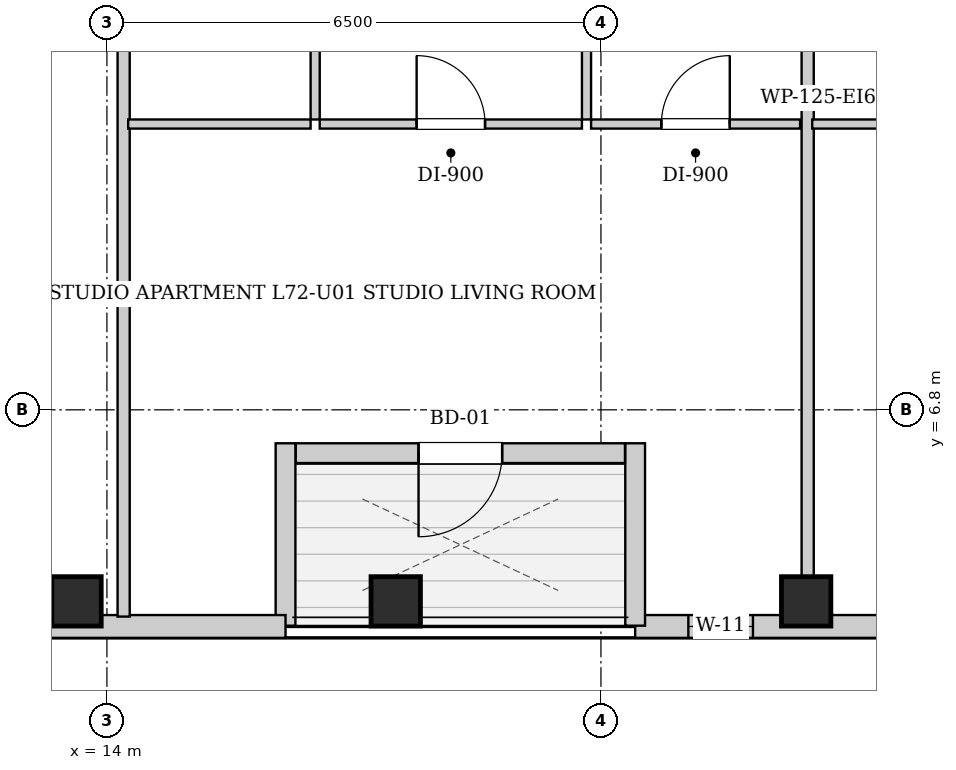
"""IFC4 building model, lengths in metres.
Left out: names, types, materials, properties, quantities, classifications, styles, units other than length and angle.
Written with IfcOpenShell. Run it as: python <this file> out.ifc"""

import sys

from ifc_helpers import new_model, si_unit, direction, frame, frame_2d, origin, origin_2d, place, context, subcontext, project, spatial, rectangle, extrude, element, fill, save


model = new_model("IFC4")
c1 = context("Model", 3, precision=1e-05, world=origin(), true_north=direction((0.0, 1.0)))
c2 = subcontext(c1, "Body", "Model", "MODEL_VIEW")
j1 = project(units=[si_unit("LENGTHUNIT", "METRE"), si_unit("PLANEANGLEUNIT", "RADIAN")], contexts=[c1])
p1 = place(None, origin())
s1 = spatial("IfcSite", under=j1, at=p1, CompositionType="ELEMENT")
p2 = place(p1, origin())
s2 = spatial("IfcBuilding", under=s1, at=p2, CompositionType="ELEMENT")
p3 = place(p2, frame((0.0, 0.0, 247.9)))
s3 = spatial("IfcBuildingStorey", under=s2, at=p3, CompositionType="ELEMENT", Elevation=247.9)
for number, where, z_axis, x_axis in (
    (1, (13.6, 4.28, 0.0), (0.0, 0.0, 1.0), (1.0, 0.0, 0.0)),
    (2, (17.8, 4.28, 0.0), (0.0, 0.0, 1.0), (1.0, 0.0, 0.0)),
    (3, (23.2, 4.28, 0.0), (0.0, 0.0, 1.0), (1.0, 0.0, 0.0)),
):
    element("IfcColumn", number, at=place(p3, frame(where, z_axis=z_axis, x_axis=x_axis)), inside=s3, PredefinedType="COLUMN", context=c2, shape_type="SweptSolid", body=[
        extrude(rectangle(XDim=0.65, YDim=0.65, at=origin_2d()), origin(), (0.0, 0.0, 1.0), 3.4),
    ])
p4 = place(p3, frame((37.8, 3.95, 0.0), z_axis=(0.0, 0.0, 1.0), x_axis=(-1.0, 0.0, 0.0)))
e4 = element("IfcWall", 4, at=p4, inside=s3, PredefinedType="SOLIDWALL", context=c2, shape_type="SweptSolid", body=[
    extrude(rectangle(XDim=16.85, YDim=0.3, at=frame_2d((8.425, 0.0))), origin(), (0.0, 0.0, 1.0), 3.14),
])
p5 = place(p4, frame((15.3, 0.0, 0.55)))
e5 = element("IfcOpeningElement", 5, at=p5, cuts=e4, PredefinedType="OPENING", context=c2, shape_type="SweptSolid", body=[
    extrude(rectangle(XDim=0.85, YDim=1.2, at=frame_2d((0.425, 0.6))), frame((0.0, 0.16, 0.0), z_axis=(0.0, -1.0, 0.0), x_axis=(1.0, 0.0, 0.0)), (0.0, 0.0, 1.0), 0.32),
])
p6 = place(p4, frame((8.95, 0.0, 0.55)))
e6 = element("IfcOpeningElement", 6, at=p6, cuts=e4, PredefinedType="OPENING", context=c2, shape_type="SweptSolid", body=[
    extrude(rectangle(XDim=1.35, YDim=1.2, at=frame_2d((0.675, 0.6))), frame((0.0, 0.16, 0.0), z_axis=(0.0, -1.0, 0.0), x_axis=(1.0, 0.0, 0.0)), (0.0, 0.0, 1.0), 0.32),
])
p7 = place(p4, frame((5.085, 0.0, 0.55)))
e7 = element("IfcOpeningElement", 7, at=p7, cuts=e4, PredefinedType="OPENING", context=c2, shape_type="SweptSolid", body=[
    extrude(rectangle(XDim=1.35, YDim=1.2, at=frame_2d((0.675, 0.6))), frame((0.0, 0.16, 0.0), z_axis=(0.0, -1.0, 0.0), x_axis=(1.0, 0.0, 0.0)), (0.0, 0.0, 1.0), 0.32),
])
p8 = place(p4, frame((2.757, 0.0, 0.55)))
e8 = element("IfcOpeningElement", 8, at=p8, cuts=e4, PredefinedType="OPENING", context=c2, shape_type="SweptSolid", body=[
    extrude(rectangle(XDim=1.35, YDim=1.2, at=frame_2d((0.675, 0.6))), frame((0.0, 0.16, 0.0), z_axis=(0.0, -1.0, 0.0), x_axis=(1.0, 0.0, 0.0)), (0.0, 0.0, 1.0), 0.32),
])
p9 = place(p3, frame((20.95, 3.96, 0.0), z_axis=(0.0, 0.0, 1.0), x_axis=(0.0, 1.0, 0.0)))
e9 = element("IfcWall", 9, at=p9, inside=s3, PredefinedType="SOLIDWALL", context=c2, shape_type="SweptSolid", body=[
    extrude(rectangle(XDim=2.4, YDim=0.26, at=frame_2d((1.2, 0.0))), origin(), (0.0, 0.0, 1.0), 3.14),
])
p10 = place(p3, frame((20.816, 6.23, 0.0), z_axis=(0.0, 0.0, 1.0), x_axis=(-1.0, 0.0, 0.0)))
e10 = element("IfcWall", 10, at=p10, inside=s3, PredefinedType="SOLIDWALL", context=c2, shape_type="SweptSolid", body=[
    extrude(rectangle(XDim=4.332, YDim=0.26, at=frame_2d((2.166, 0.0))), origin(), (0.0, 0.0, 1.0), 3.14),
])
p11 = place(p10, frame((1.616, 0.0, 0.0)))
e11 = element("IfcOpeningElement", 11, at=p11, cuts=e10, PredefinedType="OPENING", context=c2, shape_type="SweptSolid", body=[
    extrude(rectangle(XDim=1.1, YDim=2.0, at=frame_2d((0.55, 1.0))), frame((0.0, 0.14, 0.0), z_axis=(0.0, -1.0, 0.0), x_axis=(1.0, 0.0, 0.0)), (0.0, 0.0, 1.0), 0.28),
])
p12 = place(p3, frame((16.35, 6.36, 0.0), z_axis=(0.0, 0.0, 1.0), x_axis=(0.0, -1.0, 0.0)))
e12 = element("IfcWall", 12, at=p12, inside=s3, PredefinedType="SOLIDWALL", context=c2, shape_type="SweptSolid", body=[
    extrude(rectangle(XDim=2.4, YDim=0.26, at=frame_2d((1.2, 0.0))), origin(), (0.0, 0.0, 1.0), 3.14),
])
p13 = place(p3, frame((16.35, 3.95, 0.0), z_axis=(0.0, 0.0, 1.0), x_axis=(-1.0, 0.0, 0.0)))
e13 = element("IfcWall", 13, at=p13, inside=s3, PredefinedType="SOLIDWALL", context=c2, shape_type="SweptSolid", body=[
    extrude(rectangle(XDim=3.25, YDim=0.3, at=frame_2d((1.625, 0.0))), origin(), (0.0, 0.0, 1.0), 3.14),
])
p14 = place(p3, frame((14.22, 4.08, 0.0), z_axis=(0.0, 0.0, 1.0), x_axis=(0.0, 1.0, 0.0)))
e14 = element("IfcWall", 14, at=p14, inside=s3, PredefinedType="PARTITIONING", context=c2, shape_type="SweptSolid", body=[
    extrude(rectangle(XDim=9.39, YDim=0.16, at=frame_2d((4.695, 0.0))), origin(), (0.0, 0.0, 1.0), 3.14),
])
p15 = place(p3, frame((16.74, 10.62, 0.0), z_axis=(0.0, 0.0, 1.0), x_axis=(0.0, 1.0, 0.0)))
e15 = element("IfcWall", 15, at=p15, inside=s3, PredefinedType="PARTITIONING", context=c2, shape_type="SweptSolid", body=[
    extrude(rectangle(XDim=2.85, YDim=0.12, at=frame_2d((1.425, 0.0))), origin(), (0.0, 0.0, 1.0), 3.14),
])
p16 = place(p15, frame((0.995, 0.0, 0.0)))
e16 = element("IfcOpeningElement", 16, at=p16, cuts=e15, PredefinedType="OPENING", context=c2, shape_type="SweptSolid", body=[
    extrude(rectangle(XDim=0.86, YDim=2.05, at=frame_2d((0.43, 1.025))), frame((0.0, 0.07, 0.0), z_axis=(0.0, -1.0, 0.0), x_axis=(1.0, 0.0, 0.0)), (0.0, 0.0, 1.0), 0.14),
])
p17 = place(p3, frame((14.28, 10.56, 0.0), z_axis=(0.0, 0.0, 1.0), x_axis=(1.0, 0.0, 0.0)))
e17 = element("IfcWall", 17, at=p17, inside=s3, PredefinedType="PARTITIONING", context=c2, shape_type="SweptSolid", body=[
    extrude(rectangle(XDim=2.4, YDim=0.12, at=frame_2d((1.2, 0.0))), origin(), (0.0, 0.0, 1.0), 3.14),
])
p18 = place(p3, frame((20.31, 10.62, 0.0), z_axis=(0.0, 0.0, 1.0), x_axis=(0.0, 1.0, 0.0)))
e18 = element("IfcWall", 18, at=p18, inside=s3, PredefinedType="PARTITIONING", context=c2, shape_type="SweptSolid", body=[
    extrude(rectangle(XDim=2.85, YDim=0.12, at=frame_2d((1.425, 0.0))), origin(), (0.0, 0.0, 1.0), 3.14),
])
p19 = place(p18, frame((0.975, 0.0, 0.0)))
e19 = element("IfcOpeningElement", 19, at=p19, cuts=e18, PredefinedType="OPENING", context=c2, shape_type="SweptSolid", body=[
    extrude(rectangle(XDim=0.9, YDim=2.05, at=frame_2d((0.45, 1.025))), frame((0.0, 0.07, 0.0), z_axis=(0.0, -1.0, 0.0), x_axis=(1.0, 0.0, 0.0)), (0.0, 0.0, 1.0), 0.14),
])
p20 = place(p3, frame((16.8, 10.56, 0.0), z_axis=(0.0, 0.0, 1.0), x_axis=(1.0, 0.0, 0.0)))
e20 = element("IfcWall", 20, at=p20, inside=s3, PredefinedType="PARTITIONING", context=c2, shape_type="SweptSolid", body=[
    extrude(rectangle(XDim=3.45, YDim=0.12, at=frame_2d((1.725, 0.0))), origin(), (0.0, 0.0, 1.0), 3.14),
])
p21 = place(p20, frame((1.275, 0.0, 0.0)))
e21 = element("IfcOpeningElement", 21, at=p21, cuts=e20, PredefinedType="OPENING", context=c2, shape_type="SweptSolid", body=[
    extrude(rectangle(XDim=0.9, YDim=2.05, at=frame_2d((0.45, 1.025))), frame((0.0, 0.07, 0.0), z_axis=(0.0, -1.0, 0.0), x_axis=(1.0, 0.0, 0.0)), (0.0, 0.0, 1.0), 0.14),
])
p22 = place(p3, frame((20.37, 10.56, 0.0), z_axis=(0.0, 0.0, 1.0), x_axis=(1.0, 0.0, 0.0)))
e22 = element("IfcWall", 22, at=p22, inside=s3, PredefinedType="PARTITIONING", context=c2, shape_type="SweptSolid", body=[
    extrude(rectangle(XDim=2.75, YDim=0.12, at=frame_2d((1.375, 0.0))), origin(), (0.0, 0.0, 1.0), 3.14),
])
p23 = place(p22, frame((0.925, 0.0, 0.0)))
e23 = element("IfcOpeningElement", 23, at=p23, cuts=e22, PredefinedType="OPENING", context=c2, shape_type="SweptSolid", body=[
    extrude(rectangle(XDim=0.9, YDim=2.05, at=frame_2d((0.45, 1.025))), frame((0.0, 0.07, 0.0), z_axis=(0.0, -1.0, 0.0), x_axis=(1.0, 0.0, 0.0)), (0.0, 0.0, 1.0), 0.14),
])
p24 = place(p3, frame((23.22, 4.08, 0.0), z_axis=(0.0, 0.0, 1.0), x_axis=(0.0, 1.0, 0.0)))
e24 = element("IfcWall", 24, at=p24, inside=s3, PredefinedType="PARTITIONING", context=c2, shape_type="SweptSolid", body=[
    extrude(rectangle(XDim=9.39, YDim=0.16, at=frame_2d((4.695, 0.0))), origin(), (0.0, 0.0, 1.0), 3.14),
])
p25 = place(p3, frame((23.28, 10.56, 0.0), z_axis=(0.0, 0.0, 1.0), x_axis=(1.0, 0.0, 0.0)))
e25 = element("IfcWall", 25, at=p25, inside=s3, PredefinedType="PARTITIONING", context=c2, shape_type="SweptSolid", body=[
    extrude(rectangle(XDim=1.85, YDim=0.12, at=frame_2d((0.925, 0.0))), origin(), (0.0, 0.0, 1.0), 3.14),
])
p26 = place(p21, origin())
e26 = element("IfcDoor", 26, at=p26, inside=s3, OperationType="SINGLE_SWING_LEFT", PredefinedType="DOOR", context=c2, shape_type="SweptSolid", body=[
    extrude(rectangle(XDim=0.9, YDim=2.05, at=frame_2d((0.45, 1.025))), frame((0.0, 0.025, 0.0), z_axis=(0.0, -1.0, 0.0), x_axis=(1.0, 0.0, 0.0)), (0.0, 0.0, 1.0), 0.05),
])
fill(e21, e26)
p27 = place(p23, origin())
e27 = element("IfcDoor", 27, at=p27, inside=s3, OperationType="SINGLE_SWING_RIGHT", PredefinedType="DOOR", context=c2, shape_type="SweptSolid", body=[
    extrude(rectangle(XDim=0.9, YDim=2.05, at=frame_2d((0.45, 1.025))), frame((0.0, 0.025, 0.0), z_axis=(0.0, -1.0, 0.0), x_axis=(1.0, 0.0, 0.0)), (0.0, 0.0, 1.0), 0.05),
])
fill(e23, e27)
p28 = place(p11, origin())
e28 = element("IfcDoor", 28, at=p28, inside=s3, OperationType="SINGLE_SWING_RIGHT", PredefinedType="DOOR", context=c2, shape_type="SweptSolid", body=[
    extrude(rectangle(XDim=1.1, YDim=2.0, at=frame_2d((0.55, 1.0))), frame((0.0, 0.025, 0.0), z_axis=(0.0, -1.0, 0.0), x_axis=(1.0, 0.0, 0.0)), (0.0, 0.0, 1.0), 0.05),
])
fill(e11, e28)
p29 = place(p5, origin())
e29 = element("IfcWindow", 29, at=p29, inside=s3, PartitioningType="SINGLE_PANEL", PredefinedType="WINDOW", context=c2, shape_type="SweptSolid", body=[
    extrude(rectangle(XDim=0.85, YDim=1.2, at=frame_2d((0.425, 0.6))), frame((0.0, 0.03, 0.0), z_axis=(0.0, -1.0, 0.0), x_axis=(1.0, 0.0, 0.0)), (0.0, 0.0, 1.0), 0.06),
])
fill(e5, e29)
save(model, sys.argv[1])
